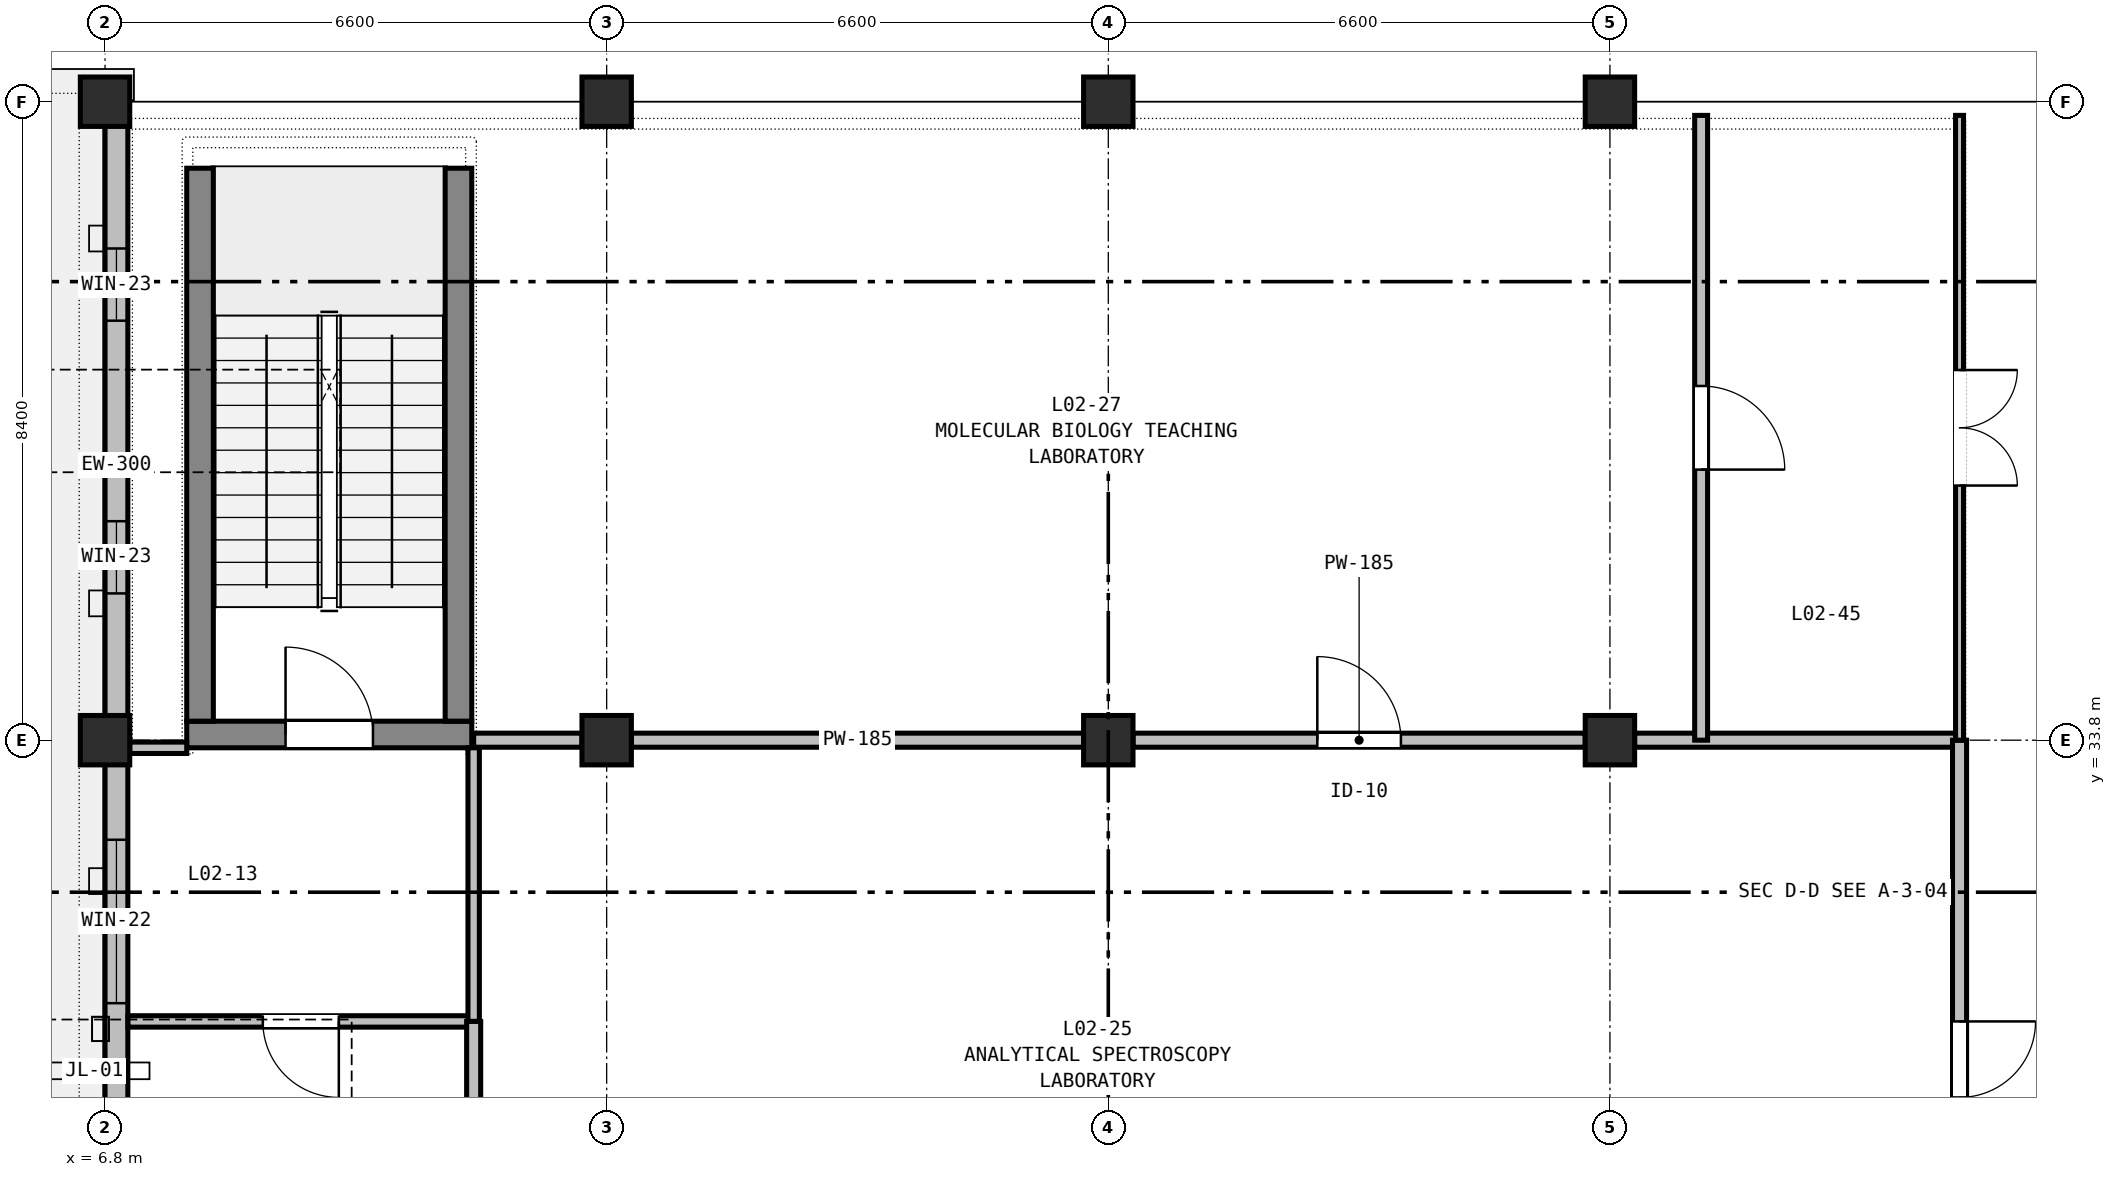
"""IFC4 building model, lengths in metres.
Left out: names, types, materials, properties, quantities, classifications, styles, units other than length and angle.
Written with IfcOpenShell. Run it as: python <this file> out.ifc"""

import sys

from ifc_helpers import new_model, si_unit, direction, frame, frame_2d, origin, origin_2d, place, context, subcontext, project, spatial, rectangle, extrude, element, fill, save


model = new_model("IFC4")
c1 = context("Model", 3, precision=1e-05, world=origin(), true_north=direction((0.0, 1.0)))
c2 = subcontext(c1, "Body", "Model", "MODEL_VIEW")
j1 = project(units=[si_unit("LENGTHUNIT", "METRE"), si_unit("PLANEANGLEUNIT", "RADIAN")], contexts=[c1])
p1 = place(None, origin())
s1 = spatial("IfcSite", under=j1, at=p1, CompositionType="ELEMENT")
p2 = place(p1, origin())
s2 = spatial("IfcBuilding", under=s1, at=p2, CompositionType="ELEMENT")
p3 = place(p2, frame((0.0, 0.0, 10.2)))
s3 = spatial("IfcBuildingStorey", under=s2, at=p3, CompositionType="ELEMENT", Elevation=10.2)
for number, where, z_axis, x_axis in (
    (1, (6.8, 33.8, 0.0), (0.0, 0.0, 1.0), (1.0, 0.0, 0.0)),
    (2, (6.8, 42.2, 0.0), (0.0, 0.0, 1.0), (1.0, 0.0, 0.0)),
    (3, (13.4, 33.8, 0.0), (0.0, 0.0, 1.0), (1.0, 0.0, 0.0)),
    (4, (13.4, 42.2, 0.0), (0.0, 0.0, 1.0), (1.0, 0.0, 0.0)),
    (5, (20.0, 33.8, 0.0), (0.0, 0.0, 1.0), (1.0, 0.0, 0.0)),
    (6, (20.0, 42.2, 0.0), (0.0, 0.0, 1.0), (1.0, 0.0, 0.0)),
    (7, (26.6, 33.8, 0.0), (0.0, 0.0, 1.0), (1.0, 0.0, 0.0)),
    (8, (26.6, 42.2, 0.0), (0.0, 0.0, 1.0), (1.0, 0.0, 0.0)),
):
    element("IfcColumn", number, at=place(p3, frame(where, z_axis=z_axis, x_axis=x_axis)), inside=s3, PredefinedType="COLUMN", context=c2, shape_type="SweptSolid", body=[
        extrude(rectangle(XDim=0.65, YDim=0.65, at=origin_2d()), origin(), (0.0, 0.0, 1.0), 4.8),
    ])
p4 = place(p3, frame((7.875, 33.875, 0.0), z_axis=(0.0, 0.0, 1.0), x_axis=(1.0, 0.0, 0.0)))
e9 = element("IfcWall", 9, at=p4, inside=s3, PredefinedType="SHEAR", context=c2, shape_type="SweptSolid", body=[
    extrude(rectangle(XDim=3.75, YDim=0.35, at=frame_2d((1.875, 0.0))), origin(), (0.0, 0.0, 1.0), 4.8),
])
p5 = place(p4, frame((1.3, 0.0, 0.0)))
e10 = element("IfcOpeningElement", 10, at=p5, cuts=e9, PredefinedType="OPENING", context=c2, shape_type="SweptSolid", body=[
    extrude(rectangle(XDim=1.15, YDim=2.15, at=frame_2d((0.575, 1.075))), frame((0.0, 0.185, 0.0), z_axis=(0.0, -1.0, 0.0), x_axis=(1.0, 0.0, 0.0)), (0.0, 0.0, 1.0), 0.37),
])
p6 = place(p3, frame((7.875, 41.5, 0.0), z_axis=(0.0, 0.0, 1.0), x_axis=(1.0, 0.0, 0.0)))
e11 = element("IfcWall", 11, at=p6, inside=s3, PredefinedType="SHEAR", context=c2, shape_type="SweptSolid", body=[
    extrude(rectangle(XDim=3.75, YDim=0.35, at=frame_2d((1.875, 0.0))), origin(), (0.0, 0.0, 1.0), 4.8),
])
for number, where, z_axis, x_axis in (
    (12, (8.05, 34.05, 0.0), (0.0, 0.0, 1.0), (0.0, 1.0, 0.0)),
    (13, (11.45, 34.05, 0.0), (0.0, 0.0, 1.0), (0.0, 1.0, 0.0)),
):
    element("IfcWall", number, at=place(p3, frame(where, z_axis=z_axis, x_axis=x_axis)), inside=s3, PredefinedType="SHEAR", context=c2, shape_type="SweptSolid", body=[
        extrude(rectangle(XDim=7.275, YDim=0.35, at=frame_2d((3.637, 0.0))), origin(), (0.0, 0.0, 1.0), 4.8),
    ])
for number, where, z_axis, x_axis in (
    (14, (6.8, 42.05, 0.0), (0.0, 0.0, 1.0), (1.0, 0.0, 0.0)),
    (15, (12.88, 42.05, 0.0), (0.0, 0.0, 1.0), (1.0, 0.0, 0.0)),
    (16, (13.4, 42.05, 0.0), (0.0, 0.0, 1.0), (1.0, 0.0, 0.0)),
    (17, (19.48, 42.05, 0.0), (0.0, 0.0, 1.0), (1.0, 0.0, 0.0)),
    (18, (20.0, 42.05, 0.0), (0.0, 0.0, 1.0), (1.0, 0.0, 0.0)),
    (19, (26.08, 42.05, 0.0), (0.0, 0.0, 1.0), (1.0, 0.0, 0.0)),
    (20, (26.6, 42.05, 0.0), (0.0, 0.0, 1.0), (1.0, 0.0, 0.0)),
):
    element("IfcWall", number, at=place(p3, frame(where, z_axis=z_axis, x_axis=x_axis)), inside=s3, PredefinedType="STANDARD", context=c2, shape_type="SweptSolid", body=[
        extrude(rectangle(XDim=0.52, YDim=0.3, at=frame_2d((0.26, 0.0))), origin(), (0.0, 0.0, 1.0), 3.935),
    ])
p7 = place(p3, frame((6.95, 25.4, 0.0), z_axis=(0.0, 0.0, 1.0), x_axis=(0.0, 1.0, 0.0)))
e21 = element("IfcWall", 21, at=p7, inside=s3, PredefinedType="STANDARD", context=c2, shape_type="SweptSolid", body=[
    extrude(rectangle(XDim=8.1, YDim=0.3, at=frame_2d((4.05, 0.0))), origin(), (0.0, 0.0, 1.0), 4.085),
])
p8 = place(p7, frame((1.112, 0.0, 0.75)))
e22 = element("IfcOpeningElement", 22, at=p8, cuts=e21, PredefinedType="OPENING", context=c2, shape_type="SweptSolid", body=[
    extrude(rectangle(XDim=2.15, YDim=2.4, at=frame_2d((1.075, 1.2))), frame((0.0, 0.16, 0.0), z_axis=(0.0, -1.0, 0.0), x_axis=(1.0, 0.0, 0.0)), (0.0, 0.0, 1.0), 0.32),
])
p9 = place(p7, frame((4.94, 0.0, 0.75)))
e23 = element("IfcOpeningElement", 23, at=p9, cuts=e21, PredefinedType="OPENING", context=c2, shape_type="SweptSolid", body=[
    extrude(rectangle(XDim=2.15, YDim=2.4, at=frame_2d((1.075, 1.2))), frame((0.0, 0.16, 0.0), z_axis=(0.0, -1.0, 0.0), x_axis=(1.0, 0.0, 0.0)), (0.0, 0.0, 1.0), 0.32),
])
p10 = place(p3, frame((6.95, 34.1, 0.0), z_axis=(0.0, 0.0, 1.0), x_axis=(0.0, 1.0, 0.0)))
e24 = element("IfcWall", 24, at=p10, inside=s3, PredefinedType="STANDARD", context=c2, shape_type="SweptSolid", body=[
    extrude(rectangle(XDim=7.8, YDim=0.3, at=frame_2d((3.9, 0.0))), origin(), (0.0, 0.0, 1.0), 4.085),
])
p11 = place(p10, frame((1.631, 0.0, 0.9)))
e25 = element("IfcOpeningElement", 25, at=p11, cuts=e24, PredefinedType="OPENING", context=c2, shape_type="SweptSolid", body=[
    extrude(rectangle(XDim=0.95, YDim=1.8, at=frame_2d((0.475, 0.9))), frame((0.0, 0.16, 0.0), z_axis=(0.0, -1.0, 0.0), x_axis=(1.0, 0.0, 0.0)), (0.0, 0.0, 1.0), 0.32),
])
p12 = place(p10, frame((5.219, 0.0, 0.9)))
e26 = element("IfcOpeningElement", 26, at=p12, cuts=e24, PredefinedType="OPENING", context=c2, shape_type="SweptSolid", body=[
    extrude(rectangle(XDim=0.95, YDim=1.8, at=frame_2d((0.475, 0.9))), frame((0.0, 0.16, 0.0), z_axis=(0.0, -1.0, 0.0), x_axis=(1.0, 0.0, 0.0)), (0.0, 0.0, 1.0), 0.32),
])
p13 = place(p3, frame((-0.28, 42.48, 0.0), z_axis=(0.0, 0.0, 1.0), x_axis=(1.0, 0.0, 0.0)))
e27 = element("IfcWall", 27, at=p13, inside=s3, PredefinedType="PARAPET", context=c2, shape_type="SweptSolid", body=[
    extrude(rectangle(XDim=7.31, YDim=0.22, at=frame_2d((3.655, 0.0))), origin(), (0.0, 0.0, 1.0), 0.68),
])
p14 = place(p3, frame((11.65, 30.1, 0.0), z_axis=(0.0, 0.0, 1.0), x_axis=(-1.0, 0.0, 0.0)))
e28 = element("IfcWall", 28, at=p14, inside=s3, PredefinedType="PARTITIONING", context=c2, shape_type="SweptSolid", body=[
    extrude(rectangle(XDim=4.548, YDim=0.15, at=frame_2d((2.274, 0.0))), origin(), (0.0, 0.0, 1.0), 4.085),
])
p15 = place(p14, frame((1.774, 0.0, 0.0)))
e29 = element("IfcOpeningElement", 29, at=p15, cuts=e28, PredefinedType="OPENING", context=c2, shape_type="SweptSolid", body=[
    extrude(rectangle(XDim=1.0, YDim=2.1, at=frame_2d((0.5, 1.05))), frame((0.0, 0.085, 0.0), z_axis=(0.0, -1.0, 0.0), x_axis=(1.0, 0.0, 0.0)), (0.0, 0.0, 1.0), 0.17),
])
p16 = place(p3, frame((7.125, 33.7, 0.0), z_axis=(0.0, 0.0, 1.0), x_axis=(1.0, 0.0, 0.0)))
e30 = element("IfcWall", 30, at=p16, inside=s3, PredefinedType="PARTITIONING", context=c2, shape_type="SweptSolid", body=[
    extrude(rectangle(XDim=0.75, YDim=0.15, at=frame_2d((0.375, 0.0))), origin(), (0.0, 0.0, 1.0), 4.135),
])
p17 = place(p3, frame((11.65, 33.7, 0.0), z_axis=(0.0, 0.0, 1.0), x_axis=(0.0, -1.0, 0.0)))
e31 = element("IfcWall", 31, at=p17, inside=s3, PredefinedType="PARTITIONING", context=c2, shape_type="SweptSolid", body=[
    extrude(rectangle(XDim=3.6, YDim=0.15, at=frame_2d((1.8, 0.0))), origin(), (0.0, 0.0, 1.0), 4.135),
])
p18 = place(p3, frame((11.65, 33.8, 0.0), z_axis=(0.0, 0.0, 1.0), x_axis=(1.0, 0.0, 0.0)))
e32 = element("IfcWall", 32, at=p18, inside=s3, PredefinedType="PARTITIONING", context=c2, shape_type="SweptSolid", body=[
    extrude(rectangle(XDim=1.425, YDim=0.185, at=frame_2d((0.712, 0.0))), origin(), (0.0, 0.0, 1.0), 4.135),
])
p19 = place(p3, frame((13.725, 33.8, 0.0), z_axis=(0.0, 0.0, 1.0), x_axis=(1.0, 0.0, 0.0)))
e33 = element("IfcWall", 33, at=p19, inside=s3, PredefinedType="PARTITIONING", context=c2, shape_type="SweptSolid", body=[
    extrude(rectangle(XDim=5.95, YDim=0.185, at=frame_2d((2.975, 0.0))), origin(), (0.0, 0.0, 1.0), 4.135),
])
p20 = place(p3, frame((20.325, 33.8, 0.0), z_axis=(0.0, 0.0, 1.0), x_axis=(1.0, 0.0, 0.0)))
e34 = element("IfcWall", 34, at=p20, inside=s3, PredefinedType="PARTITIONING", context=c2, shape_type="SweptSolid", body=[
    extrude(rectangle(XDim=5.95, YDim=0.185, at=frame_2d((2.975, 0.0))), origin(), (0.0, 0.0, 1.0), 4.135),
])
p21 = place(p20, frame((2.425, 0.0, 0.0)))
e35 = element("IfcOpeningElement", 35, at=p21, cuts=e34, PredefinedType="OPENING", context=c2, shape_type="SweptSolid", body=[
    extrude(rectangle(XDim=1.1, YDim=2.06, at=frame_2d((0.55, 1.03))), frame((0.0, 0.103, 0.0), z_axis=(0.0, -1.0, 0.0), x_axis=(1.0, 0.0, 0.0)), (0.0, 0.0, 1.0), 0.205),
])
p22 = place(p3, frame((26.925, 33.8, 0.0), z_axis=(0.0, 0.0, 1.0), x_axis=(1.0, 0.0, 0.0)))
e36 = element("IfcWall", 36, at=p22, inside=s3, PredefinedType="PARTITIONING", context=c2, shape_type="SweptSolid", body=[
    extrude(rectangle(XDim=4.275, YDim=0.185, at=frame_2d((2.137, 0.0))), origin(), (0.0, 0.0, 1.0), 4.135),
])
p23 = place(p3, frame((31.2, 33.8, 0.0), z_axis=(0.0, 0.0, 1.0), x_axis=(0.0, -1.0, 0.0)))
e37 = element("IfcWall", 37, at=p23, inside=s3, PredefinedType="PARTITIONING", context=c2, shape_type="SweptSolid", body=[
    extrude(rectangle(XDim=8.4, YDim=0.185, at=frame_2d((4.2, 0.0))), origin(), (0.0, 0.0, 1.0), 4.135),
])
p24 = place(p23, frame((3.7, 0.0, 0.0)))
e38 = element("IfcOpeningElement", 38, at=p24, cuts=e37, PredefinedType="OPENING", context=c2, shape_type="SweptSolid", body=[
    extrude(rectangle(XDim=1.0, YDim=2.06, at=frame_2d((0.5, 1.03))), frame((0.0, 0.103, 0.0), z_axis=(0.0, -1.0, 0.0), x_axis=(1.0, 0.0, 0.0)), (0.0, 0.0, 1.0), 0.205),
])
p25 = place(p3, frame((11.65, 25.4, 0.0), z_axis=(0.0, 0.0, 1.0), x_axis=(0.0, 1.0, 0.0)))
e39 = element("IfcWall", 39, at=p25, inside=s3, PredefinedType="PARTITIONING", context=c2, shape_type="SweptSolid", body=[
    extrude(rectangle(XDim=4.7, YDim=0.185, at=frame_2d((2.35, 0.0))), origin(), (0.0, 0.0, 1.0), 4.135),
])
p26 = place(p3, frame((27.8, 42.02, 0.0), z_axis=(0.0, 0.0, 1.0), x_axis=(0.0, -1.0, 0.0)))
e40 = element("IfcWall", 40, at=p26, inside=s3, PredefinedType="PARTITIONING", context=c2, shape_type="SweptSolid", body=[
    extrude(rectangle(XDim=8.22, YDim=0.17, at=frame_2d((4.11, 0.0))), origin(), (0.0, 0.0, 1.0), 4.085),
])
p27 = place(p26, frame((3.56, 0.0, 0.0)))
e41 = element("IfcOpeningElement", 41, at=p27, cuts=e40, PredefinedType="OPENING", context=c2, shape_type="SweptSolid", body=[
    extrude(rectangle(XDim=1.1, YDim=2.06, at=frame_2d((0.55, 1.03))), frame((0.0, 0.095, 0.0), z_axis=(0.0, -1.0, 0.0), x_axis=(1.0, 0.0, 0.0)), (0.0, 0.0, 1.0), 0.19),
])
p28 = place(p3, frame((31.2, 42.02, 0.0), z_axis=(0.0, 0.0, 1.0), x_axis=(0.0, -1.0, 0.0)))
e42 = element("IfcWall", 42, at=p28, inside=s3, PredefinedType="PARTITIONING", context=c2, shape_type="SweptSolid", body=[
    extrude(rectangle(XDim=8.22, YDim=0.105, at=frame_2d((4.11, 0.0))), origin(), (0.0, 0.0, 1.0), 4.085),
])
p29 = place(p28, frame((3.35, 0.0, 0.0)))
e43 = element("IfcOpeningElement", 43, at=p29, cuts=e42, PredefinedType="OPENING", context=c2, shape_type="SweptSolid", body=[
    extrude(rectangle(XDim=1.52, YDim=2.14, at=frame_2d((0.76, 1.07))), frame((0.0, 0.062, 0.0), z_axis=(0.0, -1.0, 0.0), x_axis=(1.0, 0.0, 0.0)), (0.0, 0.0, 1.0), 0.125),
])
p30 = place(p9, origin())
e44 = element("IfcWindow", 44, at=p30, inside=s3, PartitioningType="SINGLE_PANEL", PredefinedType="WINDOW", context=c2, shape_type="SweptSolid", body=[
    extrude(rectangle(XDim=2.15, YDim=2.4, at=frame_2d((1.075, 1.2))), frame((0.0, 0.03, 0.0), z_axis=(0.0, -1.0, 0.0), x_axis=(1.0, 0.0, 0.0)), (0.0, 0.0, 1.0), 0.06),
])
fill(e23, e44)
p31 = place(p11, origin())
e45 = element("IfcWindow", 45, at=p31, inside=s3, PartitioningType="SINGLE_PANEL", PredefinedType="WINDOW", context=c2, shape_type="SweptSolid", body=[
    extrude(rectangle(XDim=0.95, YDim=1.8, at=frame_2d((0.475, 0.9))), frame((0.0, 0.03, 0.0), z_axis=(0.0, -1.0, 0.0), x_axis=(1.0, 0.0, 0.0)), (0.0, 0.0, 1.0), 0.06),
])
fill(e25, e45)
p32 = place(p12, origin())
e46 = element("IfcWindow", 46, at=p32, inside=s3, PartitioningType="SINGLE_PANEL", PredefinedType="WINDOW", context=c2, shape_type="SweptSolid", body=[
    extrude(rectangle(XDim=0.95, YDim=1.8, at=frame_2d((0.475, 0.9))), frame((0.0, 0.03, 0.0), z_axis=(0.0, -1.0, 0.0), x_axis=(1.0, 0.0, 0.0)), (0.0, 0.0, 1.0), 0.06),
])
fill(e26, e46)
p33 = place(p5, origin())
e47 = element("IfcDoor", 47, at=p33, inside=s3, OperationType="SINGLE_SWING_LEFT", PredefinedType="DOOR", context=c2, shape_type="SweptSolid", body=[
    extrude(rectangle(XDim=1.15, YDim=2.15, at=frame_2d((0.575, 1.075))), frame((0.0, 0.025, 0.0), z_axis=(0.0, -1.0, 0.0), x_axis=(1.0, 0.0, 0.0)), (0.0, 0.0, 1.0), 0.05),
])
fill(e10, e47)
p34 = place(p15, origin())
e48 = element("IfcDoor", 48, at=p34, inside=s3, OperationType="SINGLE_SWING_LEFT", PredefinedType="DOOR", context=c2, shape_type="SweptSolid", body=[
    extrude(rectangle(XDim=1.0, YDim=2.1, at=frame_2d((0.5, 1.05))), frame((0.0, 0.025, 0.0), z_axis=(0.0, -1.0, 0.0), x_axis=(1.0, 0.0, 0.0)), (0.0, 0.0, 1.0), 0.05),
])
fill(e29, e48)
p35 = place(p24, origin())
e49 = element("IfcDoor", 49, at=p35, inside=s3, OperationType="SINGLE_SWING_LEFT", PredefinedType="DOOR", context=c2, shape_type="SweptSolid", body=[
    extrude(rectangle(XDim=1.0, YDim=2.06, at=frame_2d((0.5, 1.03))), frame((0.0, 0.025, 0.0), z_axis=(0.0, -1.0, 0.0), x_axis=(1.0, 0.0, 0.0)), (0.0, 0.0, 1.0), 0.05),
])
fill(e38, e49)
p36 = place(p27, origin())
e50 = element("IfcDoor", 50, at=p36, inside=s3, OperationType="SINGLE_SWING_RIGHT", PredefinedType="DOOR", context=c2, shape_type="SweptSolid", body=[
    extrude(rectangle(XDim=1.1, YDim=2.06, at=frame_2d((0.55, 1.03))), frame((0.0, 0.025, 0.0), z_axis=(0.0, -1.0, 0.0), x_axis=(1.0, 0.0, 0.0)), (0.0, 0.0, 1.0), 0.05),
])
fill(e41, e50)
p37 = place(p21, origin())
e51 = element("IfcDoor", 51, at=p37, inside=s3, OperationType="SINGLE_SWING_LEFT", PredefinedType="DOOR", context=c2, shape_type="SweptSolid", body=[
    extrude(rectangle(XDim=1.1, YDim=2.06, at=frame_2d((0.55, 1.03))), frame((0.0, 0.025, 0.0), z_axis=(0.0, -1.0, 0.0), x_axis=(1.0, 0.0, 0.0)), (0.0, 0.0, 1.0), 0.05),
])
fill(e35, e51)
p38 = place(p29, origin())
e52 = element("IfcDoor", 52, at=p38, inside=s3, OperationType="DOUBLE_DOOR_SINGLE_SWING", PredefinedType="DOOR", context=c2, shape_type="SweptSolid", body=[
    extrude(rectangle(XDim=1.52, YDim=2.14, at=frame_2d((0.76, 1.07))), frame((0.0, 0.025, 0.0), z_axis=(0.0, -1.0, 0.0), x_axis=(1.0, 0.0, 0.0)), (0.0, 0.0, 1.0), 0.05),
])
fill(e43, e52)
save(model, sys.argv[1])
